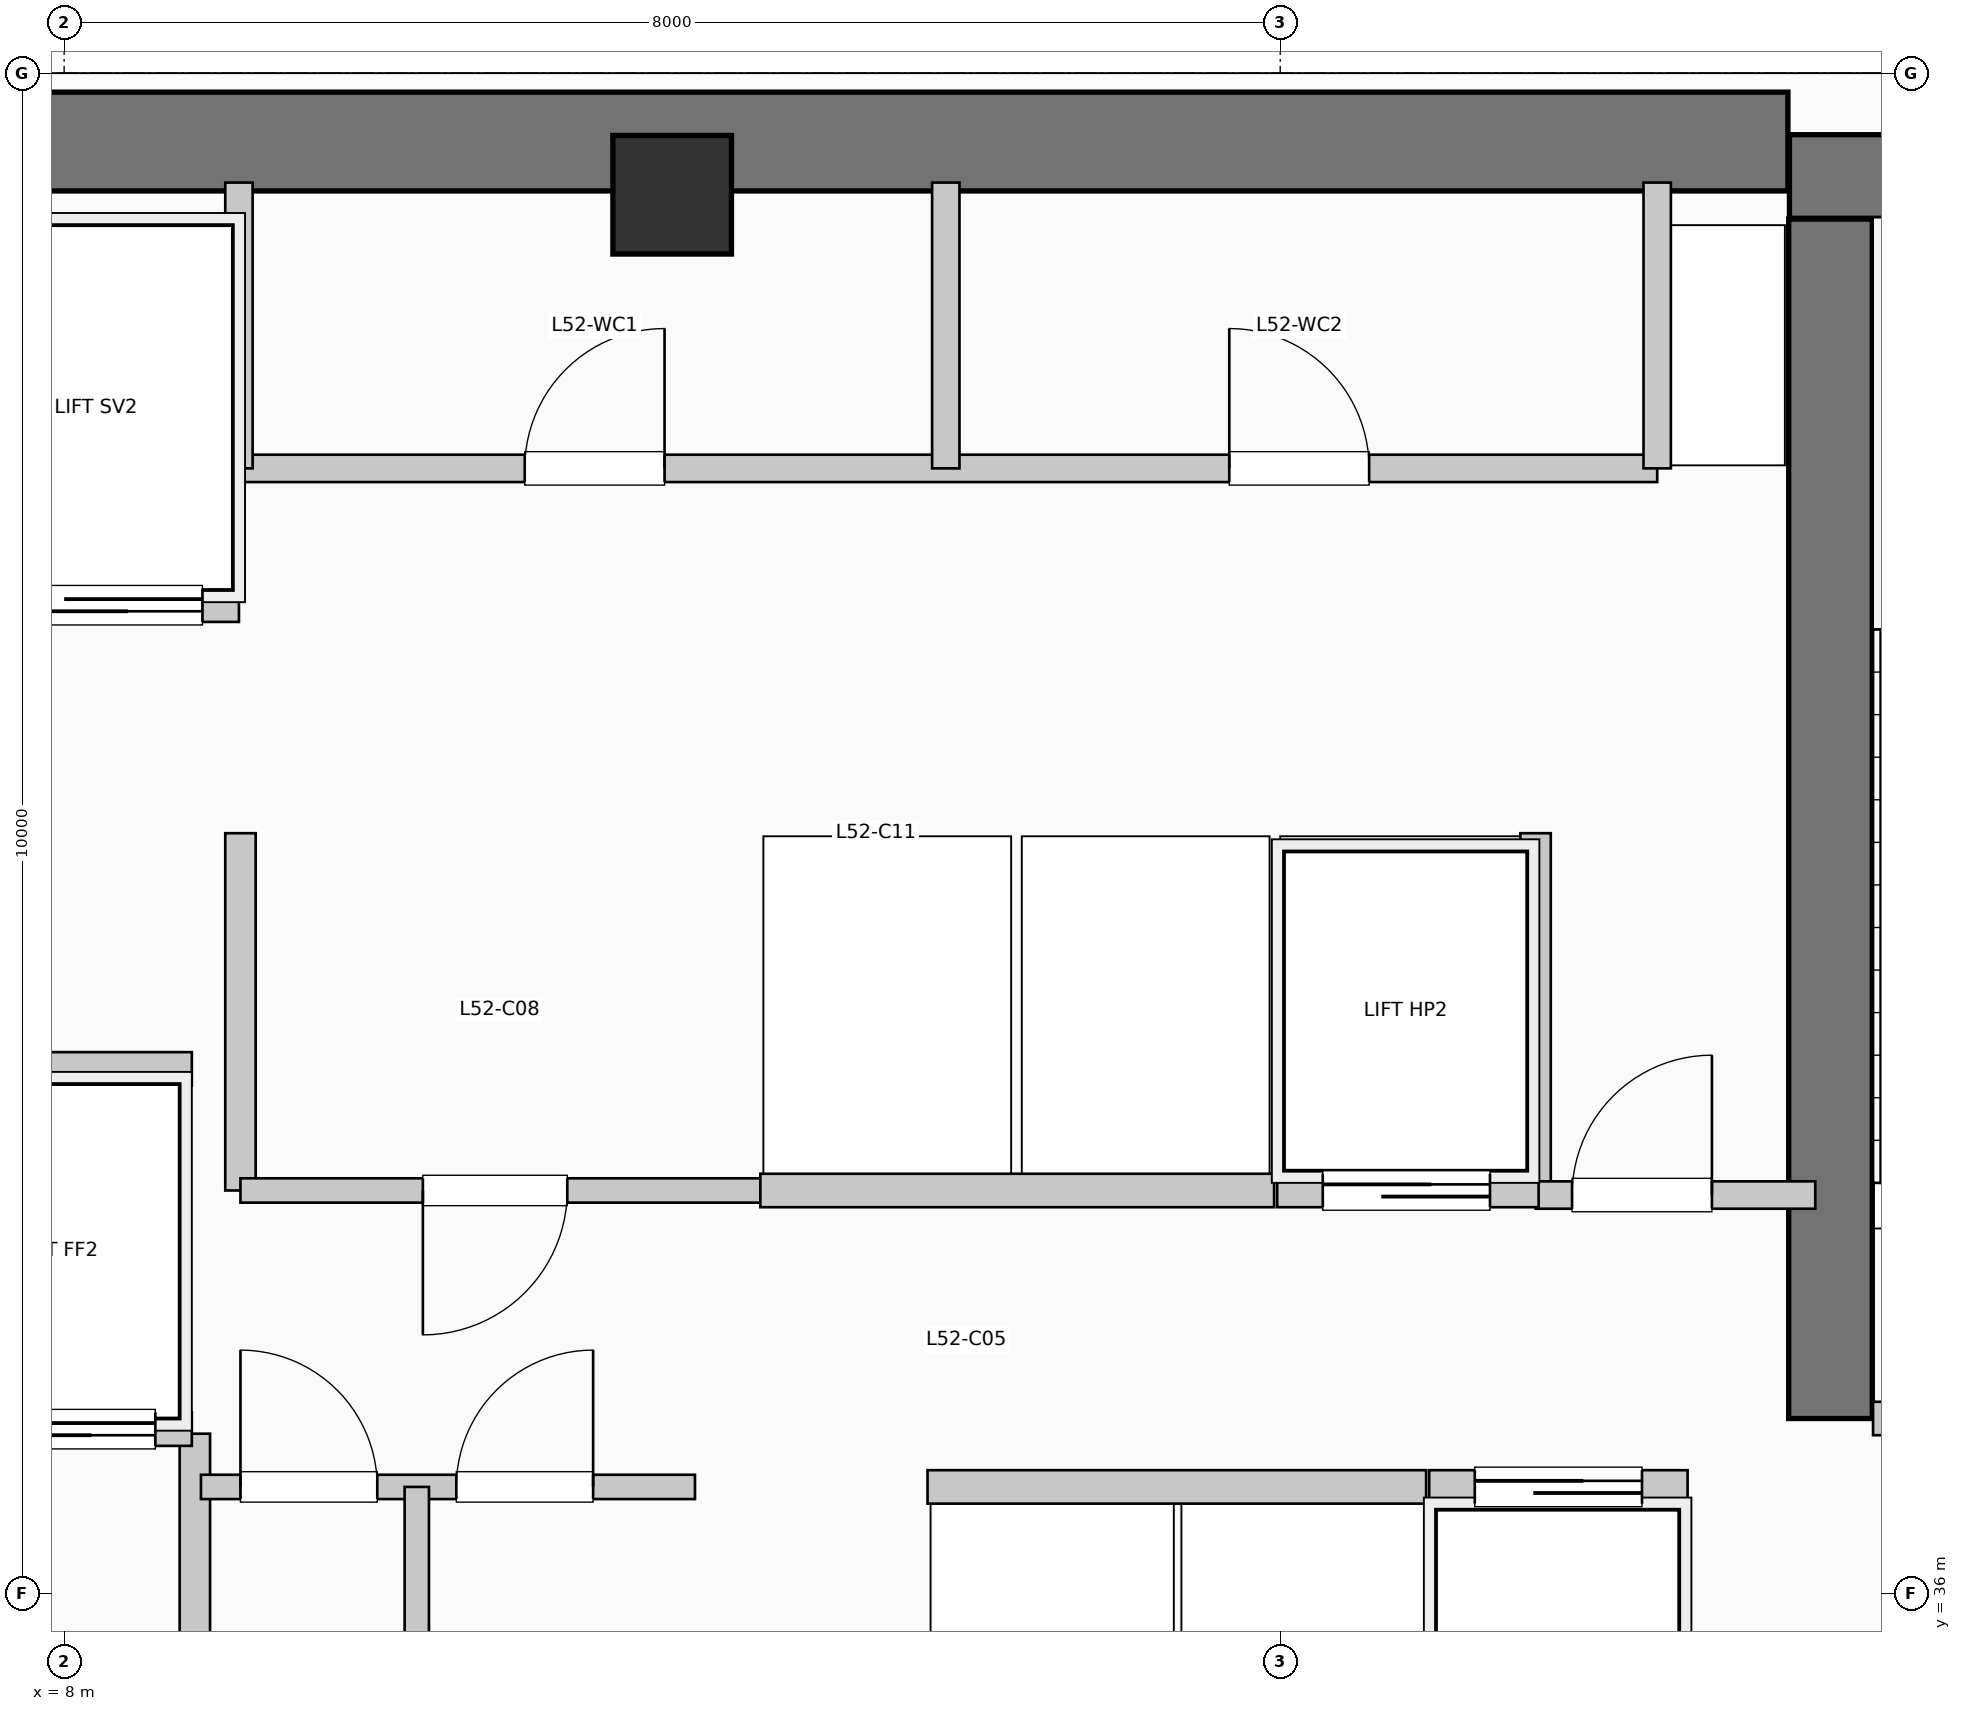
"""IFC4 building model, lengths in metres.
Left out: names, types, materials, properties, quantities, classifications, styles, units other than length and angle.
Written with IfcOpenShell. Run it as: python <this file> out.ifc"""

import sys

from ifc_helpers import new_model, si_unit, direction, frame, frame_2d, origin, origin_2d, place, context, subcontext, project, spatial, rectangle, extrude, element, fill, save


model = new_model("IFC4")
c1 = context("Model", 3, precision=1e-05, world=origin(), true_north=direction((0.0, 1.0)))
c2 = subcontext(c1, "Body", "Model", "MODEL_VIEW")
j1 = project(units=[si_unit("LENGTHUNIT", "METRE"), si_unit("PLANEANGLEUNIT", "RADIAN")], contexts=[c1])
p1 = place(None, origin())
s1 = spatial("IfcSite", under=j1, at=p1, CompositionType="ELEMENT")
p2 = place(p1, origin())
s2 = spatial("IfcBuilding", under=s1, at=p2, CompositionType="ELEMENT")
p3 = place(p2, frame((0.0, 0.0, 215.16)))
s3 = spatial("IfcBuildingStorey", under=s2, at=p3, CompositionType="ELEMENT", Elevation=215.16)
p4 = place(p3, frame((5.36, 45.55, 0.0), z_axis=(0.0, 0.0, 1.0), x_axis=(1.0, 0.0, 0.0)))
e1 = element("IfcWall", 1, at=p4, inside=s3, PredefinedType="SHEAR", context=c2, shape_type="SweptSolid", body=[
    extrude(rectangle(XDim=13.98, YDim=0.65, at=frame_2d((6.99, 0.0))), origin(), (0.0, 0.0, 1.0), 4.62),
])
p5 = place(p3, frame((19.62, 37.15, 0.0), z_axis=(0.0, 0.0, 1.0), x_axis=(0.0, 1.0, 0.0)))
e2 = element("IfcWall", 2, at=p5, inside=s3, PredefinedType="SHEAR", context=c2, shape_type="SweptSolid", body=[
    extrude(rectangle(XDim=7.89, YDim=0.55, at=frame_2d((3.945, 0.0))), origin(), (0.0, 0.0, 1.0), 4.62),
])
p6 = place(p3, frame((19.35, 45.32, 0.0), z_axis=(0.0, 0.0, 1.0), x_axis=(1.0, 0.0, 0.0)))
e3 = element("IfcWall", 3, at=p6, inside=s3, PredefinedType="SHEAR", context=c2, shape_type="SweptSolid", body=[
    extrude(rectangle(XDim=3.69, YDim=0.55, at=frame_2d((1.845, 0.0))), origin(), (0.0, 0.0, 1.0), 4.62),
])
p7 = place(p6, frame((1.15, 0.0, 1.05)))
e4 = element("IfcOpeningElement", 4, at=p7, cuts=e3, PredefinedType="OPENING", context=c2, shape_type="SweptSolid", body=[
    extrude(rectangle(XDim=1.4, YDim=1.8, at=frame_2d((0.7, 0.9))), frame((0.0, 0.285, 0.0), z_axis=(0.0, -1.0, 0.0), x_axis=(1.0, 0.0, 0.0)), (0.0, 0.0, 1.0), 0.57),
])
p8 = place(p3, frame((12.0, 45.2, 0.0), z_axis=(0.0, 0.0, 1.0), x_axis=(1.0, 0.0, 0.0)))
e5 = element("IfcColumn", 5, at=p8, inside=s3, PredefinedType="COLUMN", context=c2, shape_type="SweptSolid", body=[
    extrude(rectangle(XDim=0.78, YDim=0.78, at=origin_2d()), origin(), (0.0, 0.0, 1.0), 4.62),
])
p9 = place(p3, frame((8.86, 34.55, 0.0), z_axis=(0.0, 0.0, 1.0), x_axis=(0.0, 1.0, 0.0)))
e6 = element("IfcWall", 6, at=p9, inside=s3, PredefinedType="PARTITIONING", context=c2, shape_type="SweptSolid", body=[
    extrude(rectangle(XDim=2.5, YDim=0.2, at=frame_2d((1.25, 0.0))), origin(), (0.0, 0.0, 1.0), 4.37),
])
p10 = place(p3, frame((19.9, 37.15, 0.0), z_axis=(0.0, 0.0, 1.0), x_axis=(1.0, 0.0, 0.0)))
e7 = element("IfcWall", 7, at=p10, inside=s3, PredefinedType="PARTITIONING", context=c2, shape_type="SweptSolid", body=[
    extrude(rectangle(XDim=3.15, YDim=0.22, at=frame_2d((1.575, 0.0))), origin(), (0.0, 0.0, 1.0), 4.37),
])
p11 = place(p10, frame((2.05, 0.0, 0.0), z_axis=(0.0, 0.0, 1.0), x_axis=(-1.0, 0.0, 0.0)))
e8 = element("IfcOpeningElement", 8, at=p11, cuts=e7, PredefinedType="OPENING", context=c2, shape_type="SweptSolid", body=[
    extrude(rectangle(XDim=1.05, YDim=2.15, at=frame_2d((0.525, 1.075))), frame((0.0, 0.12, 0.0), z_axis=(0.0, -1.0, 0.0), x_axis=(1.0, 0.0, 0.0)), (0.0, 0.0, 1.0), 0.24),
])
p12 = place(p3, frame((5.38, 37.08, 0.0), z_axis=(0.0, 0.0, 1.0), x_axis=(1.0, 0.0, 0.0)))
e9 = element("IfcWall", 9, at=p12, inside=s3, PredefinedType="PARTITIONING", context=c2, shape_type="SweptSolid", body=[
    extrude(rectangle(XDim=3.46, YDim=0.22, at=frame_2d((1.73, 0.0))), origin(), (0.0, 0.0, 1.0), 4.37),
])
p13 = place(p12, frame((1.55, 0.0, 0.0), z_axis=(0.0, 0.0, 1.0), x_axis=(-1.0, 0.0, 0.0)))
e10 = element("IfcOpeningElement", 10, at=p13, cuts=e9, PredefinedType="OPENING", context=c2, shape_type="SweptSolid", body=[
    extrude(rectangle(XDim=1.2, YDim=2.2, at=frame_2d((0.6, 1.1))), frame((0.0, 0.12, 0.0), z_axis=(0.0, -1.0, 0.0), x_axis=(1.0, 0.0, 0.0)), (0.0, 0.0, 1.0), 0.24),
])
p14 = place(p12, frame((3.22, 0.0, 0.0), z_axis=(0.0, 0.0, 1.0), x_axis=(-1.0, 0.0, 0.0)))
e11 = element("IfcOpeningElement", 11, at=p14, cuts=e9, PredefinedType="OPENING", context=c2, shape_type="SweptSolid", body=[
    extrude(rectangle(XDim=1.2, YDim=2.2, at=frame_2d((0.6, 1.1))), frame((0.0, 0.12, 0.0), z_axis=(0.0, -1.0, 0.0), x_axis=(1.0, 0.0, 0.0)), (0.0, 0.0, 1.0), 0.24),
])
p15 = place(p3, frame((5.38, 39.45, 0.0), z_axis=(0.0, 0.0, 1.0), x_axis=(1.0, 0.0, 0.0)))
e12 = element("IfcWall", 12, at=p15, inside=s3, PredefinedType="PARTITIONING", context=c2, shape_type="SweptSolid", body=[
    extrude(rectangle(XDim=3.46, YDim=0.22, at=frame_2d((1.73, 0.0))), origin(), (0.0, 0.0, 1.0), 4.37),
])
p16 = place(p3, frame((5.38, 42.5, 0.0), z_axis=(0.0, 0.0, 1.0), x_axis=(1.0, 0.0, 0.0)))
e13 = element("IfcWall", 13, at=p16, inside=s3, PredefinedType="PARTITIONING", context=c2, shape_type="SweptSolid", body=[
    extrude(rectangle(XDim=3.77, YDim=0.22, at=frame_2d((1.885, 0.0))), origin(), (0.0, 0.0, 1.0), 4.37),
])
p17 = place(p16, frame((1.75, 0.0, 0.0), z_axis=(0.0, 0.0, 1.0), x_axis=(-1.0, 0.0, 0.0)))
e14 = element("IfcOpeningElement", 14, at=p17, cuts=e13, PredefinedType="OPENING", context=c2, shape_type="SweptSolid", body=[
    extrude(rectangle(XDim=1.4, YDim=2.2, at=frame_2d((0.7, 1.1))), frame((0.0, 0.12, 0.0), z_axis=(0.0, -1.0, 0.0), x_axis=(1.0, 0.0, 0.0)), (0.0, 0.0, 1.0), 0.24),
])
p18 = place(p16, frame((3.53, 0.0, 0.0), z_axis=(0.0, 0.0, 1.0), x_axis=(-1.0, 0.0, 0.0)))
e15 = element("IfcOpeningElement", 15, at=p18, cuts=e13, PredefinedType="OPENING", context=c2, shape_type="SweptSolid", body=[
    extrude(rectangle(XDim=1.4, YDim=2.2, at=frame_2d((0.7, 1.1))), frame((0.0, 0.12, 0.0), z_axis=(0.0, -1.0, 0.0), x_axis=(1.0, 0.0, 0.0)), (0.0, 0.0, 1.0), 0.24),
])
for number, where, z_axis, x_axis in (
    (16, (9.16, 38.65, 0.0), (0.0, 0.0, 1.0), (0.0, 1.0, 0.0)),
    (17, (17.68, 38.65, 0.0), (0.0, 0.0, 1.0), (0.0, 1.0, 0.0)),
):
    element("IfcWall", number, at=place(p3, frame(where, z_axis=z_axis, x_axis=x_axis)), inside=s3, PredefinedType="PARTITIONING", context=c2, shape_type="SweptSolid", body=[
        extrude(rectangle(XDim=2.35, YDim=0.2, at=frame_2d((1.175, 0.0))), origin(), (0.0, 0.0, 1.0), 4.37),
    ])
p19 = place(p3, frame((17.68, 38.62, 0.0), z_axis=(0.0, 0.0, 1.0), x_axis=(1.0, 0.0, 0.0)))
e18 = element("IfcWall", 18, at=p19, inside=s3, PredefinedType="PARTITIONING", context=c2, shape_type="SweptSolid", body=[
    extrude(rectangle(XDim=1.84, YDim=0.18, at=frame_2d((0.92, 0.0))), origin(), (0.0, 0.0, 1.0), 4.37),
])
p20 = place(p19, frame((0.24, 0.0, 0.0)))
e19 = element("IfcOpeningElement", 19, at=p20, cuts=e18, PredefinedType="OPENING", context=c2, shape_type="SweptSolid", body=[
    extrude(rectangle(XDim=0.92, YDim=2.1, at=frame_2d((0.46, 1.05))), frame((0.0, 0.1, 0.0), z_axis=(0.0, -1.0, 0.0), x_axis=(1.0, 0.0, 0.0)), (0.0, 0.0, 1.0), 0.2),
])
p21 = place(p3, frame((8.9, 36.7, 0.0), z_axis=(0.0, 0.0, 1.0), x_axis=(1.0, 0.0, 0.0)))
e20 = element("IfcWall", 20, at=p21, inside=s3, PredefinedType="PARTITIONING", context=c2, shape_type="SweptSolid", body=[
    extrude(rectangle(XDim=3.25, YDim=0.16, at=frame_2d((1.625, 0.0))), origin(), (0.0, 0.0, 1.0), 4.37),
])
p22 = place(p21, frame((0.26, 0.0, 0.0)))
e21 = element("IfcOpeningElement", 21, at=p22, cuts=e20, PredefinedType="OPENING", context=c2, shape_type="SweptSolid", body=[
    extrude(rectangle(XDim=0.9, YDim=2.15, at=frame_2d((0.45, 1.075))), frame((0.0, 0.09, 0.0), z_axis=(0.0, -1.0, 0.0), x_axis=(1.0, 0.0, 0.0)), (0.0, 0.0, 1.0), 0.18),
])
p23 = place(p21, frame((1.68, 0.0, 0.0)))
e22 = element("IfcOpeningElement", 22, at=p23, cuts=e20, PredefinedType="OPENING", context=c2, shape_type="SweptSolid", body=[
    extrude(rectangle(XDim=0.9, YDim=2.15, at=frame_2d((0.45, 1.075))), frame((0.0, 0.09, 0.0), z_axis=(0.0, -1.0, 0.0), x_axis=(1.0, 0.0, 0.0)), (0.0, 0.0, 1.0), 0.18),
])
p24 = place(p3, frame((10.32, 34.55, 0.0), z_axis=(0.0, 0.0, 1.0), x_axis=(0.0, 1.0, 0.0)))
e23 = element("IfcWall", 23, at=p24, inside=s3, PredefinedType="PARTITIONING", context=c2, shape_type="SweptSolid", body=[
    extrude(rectangle(XDim=2.15, YDim=0.16, at=frame_2d((1.075, 0.0))), origin(), (0.0, 0.0, 1.0), 4.37),
])
p25 = place(p3, frame((9.16, 38.65, 0.0), z_axis=(0.0, 0.0, 1.0), x_axis=(1.0, 0.0, 0.0)))
e24 = element("IfcWall", 24, at=p25, inside=s3, PredefinedType="PARTITIONING", context=c2, shape_type="SweptSolid", body=[
    extrude(rectangle(XDim=3.42, YDim=0.16, at=frame_2d((1.71, 0.0))), origin(), (0.0, 0.0, 1.0), 4.37),
])
p26 = place(p25, frame((2.15, 0.0, 0.0), z_axis=(0.0, 0.0, 1.0), x_axis=(-1.0, 0.0, 0.0)))
e25 = element("IfcOpeningElement", 25, at=p26, cuts=e24, PredefinedType="OPENING", context=c2, shape_type="SweptSolid", body=[
    extrude(rectangle(XDim=0.95, YDim=2.15, at=frame_2d((0.475, 1.075))), frame((0.0, 0.09, 0.0), z_axis=(0.0, -1.0, 0.0), x_axis=(1.0, 0.0, 0.0)), (0.0, 0.0, 1.0), 0.18),
])
p27 = place(p3, frame((13.68, 36.7, 0.0), z_axis=(0.0, 0.0, 1.0), x_axis=(1.0, 0.0, 0.0)))
e26 = element("IfcWall", 26, at=p27, inside=s3, PredefinedType="PARTITIONING", context=c2, shape_type="SweptSolid", body=[
    extrude(rectangle(XDim=3.28, YDim=0.22, at=frame_2d((1.64, 0.0))), origin(), (0.0, 0.0, 1.0), 4.37),
])
p28 = place(p3, frame((12.58, 38.65, 0.0), z_axis=(0.0, 0.0, 1.0), x_axis=(1.0, 0.0, 0.0)))
e27 = element("IfcWall", 27, at=p28, inside=s3, PredefinedType="PARTITIONING", context=c2, shape_type="SweptSolid", body=[
    extrude(rectangle(XDim=3.38, YDim=0.22, at=frame_2d((1.69, 0.0))), origin(), (0.0, 0.0, 1.0), 4.37),
])
p29 = place(p3, frame((16.98, 36.7, 0.0), z_axis=(0.0, 0.0, 1.0), x_axis=(1.0, 0.0, 0.0)))
e28 = element("IfcWall", 28, at=p29, inside=s3, PredefinedType="PARTITIONING", context=c2, shape_type="SweptSolid", body=[
    extrude(rectangle(XDim=1.7, YDim=0.22, at=frame_2d((0.85, 0.0))), origin(), (0.0, 0.0, 1.0), 4.37),
])
p30 = place(p29, frame((0.3, 0.0, 0.0)))
e29 = element("IfcOpeningElement", 29, at=p30, cuts=e28, PredefinedType="OPENING", context=c2, shape_type="SweptSolid", body=[
    extrude(rectangle(XDim=1.1, YDim=2.2, at=frame_2d((0.55, 1.1))), frame((0.0, 0.12, 0.0), z_axis=(0.0, -1.0, 0.0), x_axis=(1.0, 0.0, 0.0)), (0.0, 0.0, 1.0), 0.24),
])
p31 = place(p3, frame((15.98, 38.65, 0.0), z_axis=(0.0, 0.0, 1.0), x_axis=(1.0, 0.0, 0.0)))
e30 = element("IfcWall", 30, at=p31, inside=s3, PredefinedType="PARTITIONING", context=c2, shape_type="SweptSolid", body=[
    extrude(rectangle(XDim=1.72, YDim=0.22, at=frame_2d((0.86, 0.0))), origin(), (0.0, 0.0, 1.0), 4.37),
])
p32 = place(p31, frame((0.3, 0.0, 0.0)))
e31 = element("IfcOpeningElement", 31, at=p32, cuts=e30, PredefinedType="OPENING", context=c2, shape_type="SweptSolid", body=[
    extrude(rectangle(XDim=1.1, YDim=2.2, at=frame_2d((0.55, 1.1))), frame((0.0, 0.12, 0.0), z_axis=(0.0, -1.0, 0.0), x_axis=(1.0, 0.0, 0.0)), (0.0, 0.0, 1.0), 0.24),
])
p33 = place(p3, frame((9.15, 43.4, 0.0), z_axis=(0.0, 0.0, 1.0), x_axis=(1.0, 0.0, 0.0)))
e32 = element("IfcWall", 32, at=p33, inside=s3, PredefinedType="PLUMBINGWALL", context=c2, shape_type="SweptSolid", body=[
    extrude(rectangle(XDim=9.33, YDim=0.18, at=frame_2d((4.665, 0.0))), origin(), (0.0, 0.0, 1.0), 4.37),
])
p34 = place(p33, frame((1.88, 0.0, 0.0)))
e33 = element("IfcOpeningElement", 33, at=p34, cuts=e32, PredefinedType="OPENING", context=c2, shape_type="SweptSolid", body=[
    extrude(rectangle(XDim=0.92, YDim=2.1, at=frame_2d((0.46, 1.05))), frame((0.0, 0.1, 0.0), z_axis=(0.0, -1.0, 0.0), x_axis=(1.0, 0.0, 0.0)), (0.0, 0.0, 1.0), 0.2),
])
p35 = place(p33, frame((6.515, 0.0, 0.0)))
e34 = element("IfcOpeningElement", 34, at=p35, cuts=e32, PredefinedType="OPENING", context=c2, shape_type="SweptSolid", body=[
    extrude(rectangle(XDim=0.92, YDim=2.1, at=frame_2d((0.46, 1.05))), frame((0.0, 0.1, 0.0), z_axis=(0.0, -1.0, 0.0), x_axis=(1.0, 0.0, 0.0)), (0.0, 0.0, 1.0), 0.2),
])
for number, where, z_axis, x_axis in (
    (35, (9.15, 43.4, 0.0), (0.0, 0.0, 1.0), (0.0, 1.0, 0.0)),
    (36, (18.48, 43.4, 0.0), (0.0, 0.0, 1.0), (0.0, 1.0, 0.0)),
    (37, (13.8, 43.4, 0.0), (0.0, 0.0, 1.0), (0.0, 1.0, 0.0)),
):
    element("IfcWall", number, at=place(p3, frame(where, z_axis=z_axis, x_axis=x_axis)), inside=s3, PredefinedType="PLUMBINGWALL", context=c2, shape_type="SweptSolid", body=[
        extrude(rectangle(XDim=1.88, YDim=0.18, at=frame_2d((0.94, 0.0))), origin(), (0.0, 0.0, 1.0), 4.37),
    ])
p36 = place(p14, origin())
e38 = element("IfcDoor", 38, at=p36, inside=s3, OperationType="SLIDING_TO_RIGHT", PredefinedType="DOOR", context=c2, shape_type="SweptSolid", body=[
    extrude(rectangle(XDim=1.2, YDim=2.2, at=frame_2d((0.6, 1.1))), frame((0.0, 0.025, 0.0), z_axis=(0.0, -1.0, 0.0), x_axis=(1.0, 0.0, 0.0)), (0.0, 0.0, 1.0), 0.05),
])
fill(e11, e38)
p37 = place(p18, origin())
e39 = element("IfcDoor", 39, at=p37, inside=s3, OperationType="SLIDING_TO_LEFT", PredefinedType="DOOR", context=c2, shape_type="SweptSolid", body=[
    extrude(rectangle(XDim=1.4, YDim=2.2, at=frame_2d((0.7, 1.1))), frame((0.0, 0.025, 0.0), z_axis=(0.0, -1.0, 0.0), x_axis=(1.0, 0.0, 0.0)), (0.0, 0.0, 1.0), 0.05),
])
fill(e15, e39)
p38 = place(p20, origin())
e40 = element("IfcDoor", 40, at=p38, inside=s3, OperationType="SINGLE_SWING_RIGHT", PredefinedType="DOOR", context=c2, shape_type="SweptSolid", body=[
    extrude(rectangle(XDim=0.92, YDim=2.1, at=frame_2d((0.46, 1.05))), frame((0.0, 0.025, 0.0), z_axis=(0.0, -1.0, 0.0), x_axis=(1.0, 0.0, 0.0)), (0.0, 0.0, 1.0), 0.05),
])
fill(e19, e40)
p39 = place(p22, origin())
e41 = element("IfcDoor", 41, at=p39, inside=s3, OperationType="SINGLE_SWING_LEFT", PredefinedType="DOOR", context=c2, shape_type="SweptSolid", body=[
    extrude(rectangle(XDim=0.9, YDim=2.15, at=frame_2d((0.45, 1.075))), frame((0.0, 0.025, 0.0), z_axis=(0.0, -1.0, 0.0), x_axis=(1.0, 0.0, 0.0)), (0.0, 0.0, 1.0), 0.05),
])
fill(e21, e41)
p40 = place(p23, origin())
e42 = element("IfcDoor", 42, at=p40, inside=s3, OperationType="SINGLE_SWING_RIGHT", PredefinedType="DOOR", context=c2, shape_type="SweptSolid", body=[
    extrude(rectangle(XDim=0.9, YDim=2.15, at=frame_2d((0.45, 1.075))), frame((0.0, 0.025, 0.0), z_axis=(0.0, -1.0, 0.0), x_axis=(1.0, 0.0, 0.0)), (0.0, 0.0, 1.0), 0.05),
])
fill(e22, e42)
p41 = place(p26, origin())
e43 = element("IfcDoor", 43, at=p41, inside=s3, OperationType="SINGLE_SWING_LEFT", PredefinedType="DOOR", context=c2, shape_type="SweptSolid", body=[
    extrude(rectangle(XDim=0.95, YDim=2.15, at=frame_2d((0.475, 1.075))), frame((0.0, 0.025, 0.0), z_axis=(0.0, -1.0, 0.0), x_axis=(1.0, 0.0, 0.0)), (0.0, 0.0, 1.0), 0.05),
])
fill(e25, e43)
p42 = place(p30, origin())
e44 = element("IfcDoor", 44, at=p42, inside=s3, OperationType="SLIDING_TO_LEFT", PredefinedType="DOOR", context=c2, shape_type="SweptSolid", body=[
    extrude(rectangle(XDim=1.1, YDim=2.2, at=frame_2d((0.55, 1.1))), frame((0.0, 0.025, 0.0), z_axis=(0.0, -1.0, 0.0), x_axis=(1.0, 0.0, 0.0)), (0.0, 0.0, 1.0), 0.05),
])
fill(e29, e44)
p43 = place(p32, origin())
e45 = element("IfcDoor", 45, at=p43, inside=s3, OperationType="SLIDING_TO_LEFT", PredefinedType="DOOR", context=c2, shape_type="SweptSolid", body=[
    extrude(rectangle(XDim=1.1, YDim=2.2, at=frame_2d((0.55, 1.1))), frame((0.0, 0.025, 0.0), z_axis=(0.0, -1.0, 0.0), x_axis=(1.0, 0.0, 0.0)), (0.0, 0.0, 1.0), 0.05),
])
fill(e31, e45)
p44 = place(p34, origin())
e46 = element("IfcDoor", 46, at=p44, inside=s3, OperationType="SINGLE_SWING_RIGHT", PredefinedType="DOOR", context=c2, shape_type="SweptSolid", body=[
    extrude(rectangle(XDim=0.92, YDim=2.1, at=frame_2d((0.46, 1.05))), frame((0.0, 0.025, 0.0), z_axis=(0.0, -1.0, 0.0), x_axis=(1.0, 0.0, 0.0)), (0.0, 0.0, 1.0), 0.05),
])
fill(e33, e46)
p45 = place(p35, origin())
e47 = element("IfcDoor", 47, at=p45, inside=s3, OperationType="SINGLE_SWING_LEFT", PredefinedType="DOOR", context=c2, shape_type="SweptSolid", body=[
    extrude(rectangle(XDim=0.92, YDim=2.1, at=frame_2d((0.46, 1.05))), frame((0.0, 0.025, 0.0), z_axis=(0.0, -1.0, 0.0), x_axis=(1.0, 0.0, 0.0)), (0.0, 0.0, 1.0), 0.05),
])
fill(e34, e47)
save(model, sys.argv[1])
